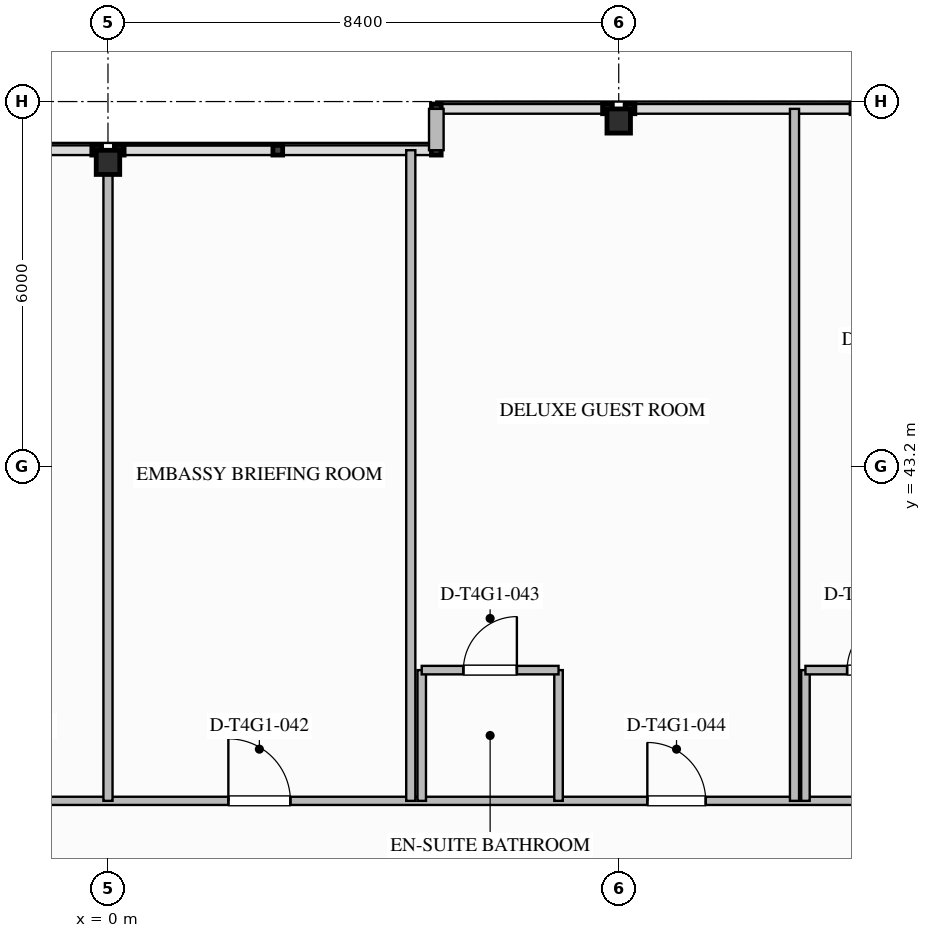
"""IFC4 building model, lengths in metres.
Left out: names, types, materials, properties, quantities, classifications, styles, units other than length and angle.
Written with IfcOpenShell. Run it as: python <this file> out.ifc"""

import sys

from ifc_helpers import new_model, si_unit, direction, frame, frame_2d, origin, origin_2d, place, context, subcontext, project, spatial, rectangle, i_section, extrude, element, fill, save


model = new_model("IFC4")
c1 = context("Model", 3, precision=1e-05, world=origin(), true_north=direction((0.0, 1.0)))
c2 = subcontext(c1, "Body", "Model", "MODEL_VIEW")
j1 = project(units=[si_unit("LENGTHUNIT", "METRE"), si_unit("PLANEANGLEUNIT", "RADIAN")], contexts=[c1])
p1 = place(None, origin())
s1 = spatial("IfcSite", under=j1, at=p1, CompositionType="ELEMENT")
p2 = place(p1, origin())
s2 = spatial("IfcBuilding", under=s1, at=p2, CompositionType="ELEMENT")
p3 = place(p2, frame((0.0, 0.0, 205.1)))
s3 = spatial("IfcBuildingStorey", under=s2, at=p3, CompositionType="ELEMENT", Elevation=205.1)
for number, where, z_axis, x_axis in (
    (1, (0.0, 48.2, 0.0), (0.0, 0.0, 1.0), (0.0, 1.0, 0.0)),
    (2, (8.4, 48.88, 0.0), (0.0, 0.0, 1.0), (0.0, 1.0, 0.0)),
):
    element("IfcColumn", number, at=place(p3, frame(where, z_axis=z_axis, x_axis=x_axis)), inside=s3, PredefinedType="COLUMN", context=c2, shape_type="SweptSolid", body=[
        extrude(i_section(OverallWidth=0.397, OverallDepth=0.387, WebThickness=0.021, FlangeThickness=0.033, FilletRadius=0.025, at=origin_2d()), origin(), (0.0, 0.0, 1.0), 3.597),
    ])
p4 = place(p3, frame((5.4, 48.4, 0.0), z_axis=(0.0, 0.0, 1.0), x_axis=(0.0, 1.0, 0.0)))
e3 = element("IfcWall", 3, at=p4, inside=s3, PredefinedType="STANDARD", context=c2, shape_type="SweptSolid", body=[
    extrude(rectangle(XDim=0.68, YDim=0.24, at=frame_2d((0.34, 0.0))), origin(), (0.0, 0.0, 1.0), 3.34),
])
p5 = place(p3, frame((-16.2, 37.7, 0.0), z_axis=(0.0, 0.0, 1.0), x_axis=(1.0, 0.0, 0.0)))
e4 = element("IfcWall", 4, at=p5, inside=s3, PredefinedType="PARTITIONING", context=c2, shape_type="SweptSolid", body=[
    extrude(rectangle(XDim=38.28, YDim=0.135, at=frame_2d((19.14, 0.0))), origin(), (0.0, 0.0, 1.0), 3.34),
])
p6 = place(p5, frame((35.785, 0.0, 0.0)))
e5 = element("IfcOpeningElement", 5, at=p6, cuts=e4, PredefinedType="OPENING", context=c2, shape_type="SweptSolid", body=[
    extrude(rectangle(XDim=1.26, YDim=2.2, at=frame_2d((0.63, 1.1))), frame((0.0, 0.077, 0.0), z_axis=(0.0, -1.0, 0.0), x_axis=(1.0, 0.0, 0.0)), (0.0, 0.0, 1.0), 0.155),
])
p7 = place(p5, frame((3.189, 0.0, 0.0)))
e6 = element("IfcOpeningElement", 6, at=p7, cuts=e4, PredefinedType="OPENING", context=c2, shape_type="SweptSolid", body=[
    extrude(rectangle(XDim=0.96, YDim=2.15, at=frame_2d((0.48, 1.075))), frame((0.0, 0.077, 0.0), z_axis=(0.0, -1.0, 0.0), x_axis=(1.0, 0.0, 0.0)), (0.0, 0.0, 1.0), 0.155),
])
p8 = place(p5, frame((8.379, 0.0, 0.0)))
e7 = element("IfcOpeningElement", 7, at=p8, cuts=e4, PredefinedType="OPENING", context=c2, shape_type="SweptSolid", body=[
    extrude(rectangle(XDim=0.96, YDim=2.15, at=frame_2d((0.48, 1.075))), frame((0.0, 0.077, 0.0), z_axis=(0.0, -1.0, 0.0), x_axis=(1.0, 0.0, 0.0)), (0.0, 0.0, 1.0), 0.155),
])
p9 = place(p5, frame((14.025, 0.0, 0.0)))
e8 = element("IfcOpeningElement", 8, at=p9, cuts=e4, PredefinedType="OPENING", context=c2, shape_type="SweptSolid", body=[
    extrude(rectangle(XDim=0.96, YDim=2.15, at=frame_2d((0.48, 1.075))), frame((0.0, 0.077, 0.0), z_axis=(0.0, -1.0, 0.0), x_axis=(1.0, 0.0, 0.0)), (0.0, 0.0, 1.0), 0.155),
])
p10 = place(p5, frame((18.18, 0.0, 0.0)))
e9 = element("IfcOpeningElement", 9, at=p10, cuts=e4, PredefinedType="OPENING", context=c2, shape_type="SweptSolid", body=[
    extrude(rectangle(XDim=1.02, YDim=2.15, at=frame_2d((0.51, 1.075))), frame((0.0, 0.077, 0.0), z_axis=(0.0, -1.0, 0.0), x_axis=(1.0, 0.0, 0.0)), (0.0, 0.0, 1.0), 0.155),
])
p11 = place(p5, frame((25.071, 0.0, 0.0)))
e10 = element("IfcOpeningElement", 10, at=p11, cuts=e4, PredefinedType="OPENING", context=c2, shape_type="SweptSolid", body=[
    extrude(rectangle(XDim=0.96, YDim=2.15, at=frame_2d((0.48, 1.075))), frame((0.0, 0.077, 0.0), z_axis=(0.0, -1.0, 0.0), x_axis=(1.0, 0.0, 0.0)), (0.0, 0.0, 1.0), 0.155),
])
p12 = place(p5, frame((30.68, 0.0, 0.0)))
e11 = element("IfcOpeningElement", 11, at=p12, cuts=e4, PredefinedType="OPENING", context=c2, shape_type="SweptSolid", body=[
    extrude(rectangle(XDim=0.96, YDim=2.15, at=frame_2d((0.48, 1.075))), frame((0.0, 0.077, 0.0), z_axis=(0.0, -1.0, 0.0), x_axis=(1.0, 0.0, 0.0)), (0.0, 0.0, 1.0), 0.155),
])
p13 = place(p3, frame((0.0, 37.7, 0.0), z_axis=(0.0, 0.0, 1.0), x_axis=(0.0, 1.0, 0.0)))
e12 = element("IfcWall", 12, at=p13, inside=s3, PredefinedType="PARTITIONING", context=c2, shape_type="SweptSolid", body=[
    extrude(rectangle(XDim=10.7, YDim=0.15, at=frame_2d((5.35, 0.0))), origin(), (0.0, 0.0, 1.0), 2.717),
])
p14 = place(p3, frame((4.98, 37.7, 0.0), z_axis=(0.0, 0.0, 1.0), x_axis=(0.0, 1.0, 0.0)))
e13 = element("IfcWall", 13, at=p14, inside=s3, PredefinedType="PARTITIONING", context=c2, shape_type="SweptSolid", body=[
    extrude(rectangle(XDim=10.7, YDim=0.15, at=frame_2d((5.35, 0.0))), origin(), (0.0, 0.0, 1.0), 3.34),
])
for number, where, z_axis, x_axis in (
    (14, (5.16, 37.7, 0.0), (0.0, 0.0, 1.0), (0.0, 1.0, 0.0)),
    (15, (7.41, 37.7, 0.0), (0.0, 0.0, 1.0), (0.0, 1.0, 0.0)),
):
    element("IfcWall", number, at=place(p3, frame(where, z_axis=z_axis, x_axis=x_axis)), inside=s3, PredefinedType="PLUMBINGWALL", context=c2, shape_type="SweptSolid", body=[
        extrude(rectangle(XDim=2.15, YDim=0.14, at=frame_2d((1.075, 0.0))), origin(), (0.0, 0.0, 1.0), 3.34),
    ])
p15 = place(p3, frame((5.16, 39.85, 0.0), z_axis=(0.0, 0.0, 1.0), x_axis=(1.0, 0.0, 0.0)))
e16 = element("IfcWall", 16, at=p15, inside=s3, PredefinedType="PLUMBINGWALL", context=c2, shape_type="SweptSolid", body=[
    extrude(rectangle(XDim=2.25, YDim=0.14, at=frame_2d((1.125, 0.0))), origin(), (0.0, 0.0, 1.0), 3.34),
])
p16 = place(p15, frame((0.685, 0.0, 0.0)))
e17 = element("IfcOpeningElement", 17, at=p16, cuts=e16, PredefinedType="OPENING", context=c2, shape_type="SweptSolid", body=[
    extrude(rectangle(XDim=0.88, YDim=2.1, at=frame_2d((0.44, 1.05))), frame((0.0, 0.08, 0.0), z_axis=(0.0, -1.0, 0.0), x_axis=(1.0, 0.0, 0.0)), (0.0, 0.0, 1.0), 0.16),
])
p17 = place(p3, frame((11.291, 37.7, 0.0), z_axis=(0.0, 0.0, 1.0), x_axis=(0.0, 1.0, 0.0)))
e18 = element("IfcWall", 18, at=p17, inside=s3, PredefinedType="PARTITIONING", context=c2, shape_type="SweptSolid", body=[
    extrude(rectangle(XDim=11.38, YDim=0.15, at=frame_2d((5.69, 0.0))), origin(), (0.0, 0.0, 1.0), 3.34),
])
p18 = place(p3, frame((11.471, 37.7, 0.0), z_axis=(0.0, 0.0, 1.0), x_axis=(0.0, 1.0, 0.0)))
e19 = element("IfcWall", 19, at=p18, inside=s3, PredefinedType="PLUMBINGWALL", context=c2, shape_type="SweptSolid", body=[
    extrude(rectangle(XDim=2.15, YDim=0.14, at=frame_2d((1.075, 0.0))), origin(), (0.0, 0.0, 1.0), 3.34),
])
p19 = place(p3, frame((11.471, 39.85, 0.0), z_axis=(0.0, 0.0, 1.0), x_axis=(1.0, 0.0, 0.0)))
e20 = element("IfcWall", 20, at=p19, inside=s3, PredefinedType="PLUMBINGWALL", context=c2, shape_type="SweptSolid", body=[
    extrude(rectangle(XDim=2.25, YDim=0.14, at=frame_2d((1.125, 0.0))), origin(), (0.0, 0.0, 1.0), 3.34),
])
p20 = place(p19, frame((0.685, 0.0, 0.0)))
e21 = element("IfcOpeningElement", 21, at=p20, cuts=e20, PredefinedType="OPENING", context=c2, shape_type="SweptSolid", body=[
    extrude(rectangle(XDim=0.88, YDim=2.1, at=frame_2d((0.44, 1.05))), frame((0.0, 0.08, 0.0), z_axis=(0.0, -1.0, 0.0), x_axis=(1.0, 0.0, 0.0)), (0.0, 0.0, 1.0), 0.16),
])
p21 = place(p10, origin())
e22 = element("IfcDoor", 22, at=p21, inside=s3, OperationType="SINGLE_SWING_LEFT", PredefinedType="DOOR", context=c2, shape_type="SweptSolid", body=[
    extrude(rectangle(XDim=1.02, YDim=2.15, at=frame_2d((0.51, 1.075))), frame((0.0, 0.025, 0.0), z_axis=(0.0, -1.0, 0.0), x_axis=(1.0, 0.0, 0.0)), (0.0, 0.0, 1.0), 0.05),
])
fill(e9, e22)
p22 = place(p16, origin())
e23 = element("IfcDoor", 23, at=p22, inside=s3, OperationType="SINGLE_SWING_RIGHT", PredefinedType="DOOR", context=c2, shape_type="SweptSolid", body=[
    extrude(rectangle(XDim=0.88, YDim=2.1, at=frame_2d((0.44, 1.05))), frame((0.0, 0.025, 0.0), z_axis=(0.0, -1.0, 0.0), x_axis=(1.0, 0.0, 0.0)), (0.0, 0.0, 1.0), 0.05),
])
fill(e17, e23)
p23 = place(p11, origin())
e24 = element("IfcDoor", 24, at=p23, inside=s3, OperationType="SINGLE_SWING_LEFT", PredefinedType="DOOR", context=c2, shape_type="SweptSolid", body=[
    extrude(rectangle(XDim=0.96, YDim=2.15, at=frame_2d((0.48, 1.075))), frame((0.0, 0.025, 0.0), z_axis=(0.0, -1.0, 0.0), x_axis=(1.0, 0.0, 0.0)), (0.0, 0.0, 1.0), 0.05),
])
fill(e10, e24)
p24 = place(p20, origin())
e25 = element("IfcDoor", 25, at=p24, inside=s3, OperationType="SINGLE_SWING_RIGHT", PredefinedType="DOOR", context=c2, shape_type="SweptSolid", body=[
    extrude(rectangle(XDim=0.88, YDim=2.1, at=frame_2d((0.44, 1.05))), frame((0.0, 0.025, 0.0), z_axis=(0.0, -1.0, 0.0), x_axis=(1.0, 0.0, 0.0)), (0.0, 0.0, 1.0), 0.05),
])
fill(e21, e25)
save(model, sys.argv[1])
